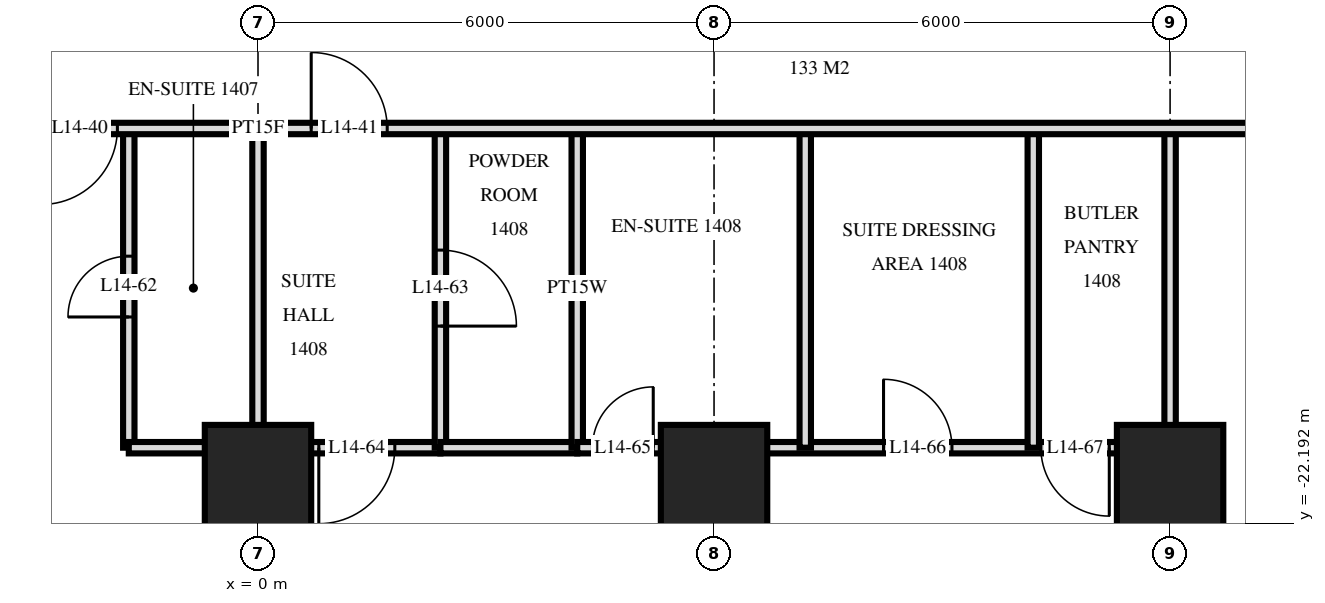
"""IFC4 building model, lengths in metres.
Left out: names, types, materials, properties, quantities, classifications, styles, units other than length and angle.
Written with IfcOpenShell. Run it as: python <this file> out.ifc"""

import sys

from ifc_helpers import new_model, si_unit, direction, frame, frame_2d, origin, origin_2d, place, context, subcontext, project, spatial, rectangle, extrude, element, fill, save


model = new_model("IFC4")
c1 = context("Model", 3, precision=1e-05, world=origin(), true_north=direction((0.0, 1.0)))
c2 = subcontext(c1, "Body", "Model", "MODEL_VIEW")
j1 = project(units=[si_unit("LENGTHUNIT", "METRE"), si_unit("PLANEANGLEUNIT", "RADIAN")], contexts=[c1])
p1 = place(None, origin())
s1 = spatial("IfcSite", under=j1, at=p1, CompositionType="ELEMENT")
p2 = place(p1, origin())
s2 = spatial("IfcBuilding", under=s1, at=p2, CompositionType="ELEMENT")
p3 = place(p2, frame((0.0, 0.0, 60.0)))
s3 = spatial("IfcBuildingStorey", under=s2, at=p3, CompositionType="ELEMENT", Elevation=60.0)
for number, where, z_axis, x_axis in (
    (1, (0.0, -21.6, 0.0), (0.0, 0.0, 1.0), (1.0, 0.0, 0.0)),
    (2, (6.0, -21.6, 0.0), (0.0, 0.0, 1.0), (1.0, 0.0, 0.0)),
    (3, (12.0, -21.6, 0.0), (0.0, 0.0, 1.0), (1.0, 0.0, 0.0)),
):
    element("IfcColumn", number, at=place(p3, frame(where, z_axis=z_axis, x_axis=x_axis)), inside=s3, PredefinedType="COLUMN", context=c2, shape_type="SweptSolid", body=[
        extrude(rectangle(XDim=1.4, YDim=1.4, at=origin_2d()), origin(), (0.0, 0.0, 1.0), 3.6),
    ])
p4 = place(p3, frame((12.0, -29.22, 0.0), z_axis=(0.0, 0.0, 1.0), x_axis=(0.0, 1.0, 0.0)))
e4 = element("IfcWall", 4, at=p4, inside=s3, PredefinedType="PARTITIONING", context=c2, shape_type="SweptSolid", body=[
    extrude(rectangle(XDim=12.22, YDim=0.15, at=frame_2d((6.11, 0.0))), origin(), (0.0, 0.0, 1.0), 3.32),
])
for number, where, z_axis, x_axis in (
    (5, (10.2, -21.2, 0.0), (0.0, 0.0, 1.0), (0.0, 1.0, 0.0)),
    (6, (7.2, -21.2, 0.0), (0.0, 0.0, 1.0), (0.0, 1.0, 0.0)),
):
    element("IfcWall", number, at=place(p3, frame(where, z_axis=z_axis, x_axis=x_axis)), inside=s3, PredefinedType="PARTITIONING", context=c2, shape_type="SweptSolid", body=[
        extrude(rectangle(XDim=4.2, YDim=0.15, at=frame_2d((2.1, 0.0))), origin(), (0.0, 0.0, 1.0), 3.32),
    ])
p5 = place(p3, frame((6.0, -29.22, 0.0), z_axis=(0.0, 0.0, 1.0), x_axis=(0.0, 1.0, 0.0)))
e7 = element("IfcWall", 7, at=p5, inside=s3, PredefinedType="PARTITIONING", context=c2, shape_type="SweptSolid", body=[
    extrude(rectangle(XDim=8.02, YDim=0.15, at=frame_2d((4.01, 0.0))), origin(), (0.0, 0.0, 1.0), 3.32),
])
p6 = place(p5, frame((3.45, 0.0, 0.0)))
e8 = element("IfcOpeningElement", 8, at=p6, cuts=e7, PredefinedType="OPENING", context=c2, shape_type="SweptSolid", body=[
    extrude(rectangle(XDim=0.9, YDim=2.1, at=frame_2d((0.45, 1.05))), frame((0.0, 0.085, 0.0), z_axis=(0.0, -1.0, 0.0), x_axis=(1.0, 0.0, 0.0)), (0.0, 0.0, 1.0), 0.17),
])
p7 = place(p3, frame((4.2, -21.2, 0.0), z_axis=(0.0, 0.0, 1.0), x_axis=(0.0, 1.0, 0.0)))
e9 = element("IfcWall", 9, at=p7, inside=s3, PredefinedType="PLUMBINGWALL", context=c2, shape_type="SweptSolid", body=[
    extrude(rectangle(XDim=4.2, YDim=0.15, at=frame_2d((2.1, 0.0))), origin(), (0.0, 0.0, 1.0), 3.32),
])
p8 = place(p3, frame((2.4, -21.2, 0.0), z_axis=(0.0, 0.0, 1.0), x_axis=(0.0, 1.0, 0.0)))
e10 = element("IfcWall", 10, at=p8, inside=s3, PredefinedType="PARTITIONING", context=c2, shape_type="SweptSolid", body=[
    extrude(rectangle(XDim=4.2, YDim=0.15, at=frame_2d((2.1, 0.0))), origin(), (0.0, 0.0, 1.0), 3.32),
])
p9 = place(p8, frame((1.6, 0.0, 0.0)))
e11 = element("IfcOpeningElement", 11, at=p9, cuts=e10, PredefinedType="OPENING", context=c2, shape_type="SweptSolid", body=[
    extrude(rectangle(XDim=1.0, YDim=2.1, at=frame_2d((0.5, 1.05))), frame((0.0, 0.085, 0.0), z_axis=(0.0, -1.0, 0.0), x_axis=(1.0, 0.0, 0.0)), (0.0, 0.0, 1.0), 0.17),
])
p10 = place(p3, frame((0.0, -21.2, 0.0), z_axis=(0.0, 0.0, 1.0), x_axis=(0.0, 1.0, 0.0)))
e12 = element("IfcWall", 12, at=p10, inside=s3, PredefinedType="PARTITIONING", context=c2, shape_type="SweptSolid", body=[
    extrude(rectangle(XDim=4.2, YDim=0.15, at=frame_2d((2.1, 0.0))), origin(), (0.0, 0.0, 1.0), 3.32),
])
p11 = place(p3, frame((0.0, -29.22, 0.0), z_axis=(0.0, 0.0, 1.0), x_axis=(0.0, 1.0, 0.0)))
e13 = element("IfcWall", 13, at=p11, inside=s3, PredefinedType="PARTITIONING", context=c2, shape_type="SweptSolid", body=[
    extrude(rectangle(XDim=8.02, YDim=0.15, at=frame_2d((4.01, 0.0))), origin(), (0.0, 0.0, 1.0), 3.32),
])
p12 = place(p3, frame((-1.7, -21.2, 0.0), z_axis=(0.0, 0.0, 1.0), x_axis=(0.0, 1.0, 0.0)))
e14 = element("IfcWall", 14, at=p12, inside=s3, PredefinedType="PARTITIONING", context=c2, shape_type="SweptSolid", body=[
    extrude(rectangle(XDim=4.2, YDim=0.15, at=frame_2d((2.1, 0.0))), origin(), (0.0, 0.0, 1.0), 3.32),
])
p13 = place(p12, frame((1.72, 0.0, 0.0)))
e15 = element("IfcOpeningElement", 15, at=p13, cuts=e14, PredefinedType="OPENING", context=c2, shape_type="SweptSolid", body=[
    extrude(rectangle(XDim=0.8, YDim=2.1, at=frame_2d((0.4, 1.05))), frame((0.0, 0.085, 0.0), z_axis=(0.0, -1.0, 0.0), x_axis=(1.0, 0.0, 0.0)), (0.0, 0.0, 1.0), 0.17),
])
p14 = place(p3, frame((0.0, -21.2, 0.0), z_axis=(0.0, 0.0, 1.0), x_axis=(1.0, 0.0, 0.0)))
e16 = element("IfcWall", 16, at=p14, inside=s3, PredefinedType="PARTITIONING", context=c2, shape_type="SweptSolid", body=[
    extrude(rectangle(XDim=2.4, YDim=0.15, at=frame_2d((1.2, 0.0))), origin(), (0.0, 0.0, 1.0), 3.32),
])
p15 = place(p14, frame((0.8, 0.0, 0.0)))
e17 = element("IfcOpeningElement", 17, at=p15, cuts=e16, PredefinedType="OPENING", context=c2, shape_type="SweptSolid", body=[
    extrude(rectangle(XDim=1.0, YDim=2.1, at=frame_2d((0.5, 1.05))), frame((0.0, 0.085, 0.0), z_axis=(0.0, -1.0, 0.0), x_axis=(1.0, 0.0, 0.0)), (0.0, 0.0, 1.0), 0.17),
])
p16 = place(p3, frame((-1.7, -21.2, 0.0), z_axis=(0.0, 0.0, 1.0), x_axis=(1.0, 0.0, 0.0)))
e18 = element("IfcWall", 18, at=p16, inside=s3, PredefinedType="PARTITIONING", context=c2, shape_type="SweptSolid", body=[
    extrude(rectangle(XDim=1.7, YDim=0.15, at=frame_2d((0.85, 0.0))), origin(), (0.0, 0.0, 1.0), 3.32),
])
p17 = place(p3, frame((4.2, -21.2, 0.0), z_axis=(0.0, 0.0, 1.0), x_axis=(1.0, 0.0, 0.0)))
e19 = element("IfcWall", 19, at=p17, inside=s3, PredefinedType="PARTITIONING", context=c2, shape_type="SweptSolid", body=[
    extrude(rectangle(XDim=7.8, YDim=0.15, at=frame_2d((3.9, 0.0))), origin(), (0.0, 0.0, 1.0), 3.32),
])
p18 = place(p17, frame((0.2, 0.0, 0.0)))
e20 = element("IfcOpeningElement", 20, at=p18, cuts=e19, PredefinedType="OPENING", context=c2, shape_type="SweptSolid", body=[
    extrude(rectangle(XDim=0.8, YDim=2.1, at=frame_2d((0.4, 1.05))), frame((0.0, 0.085, 0.0), z_axis=(0.0, -1.0, 0.0), x_axis=(1.0, 0.0, 0.0)), (0.0, 0.0, 1.0), 0.17),
])
p19 = place(p17, frame((4.03, 0.0, 0.0)))
e21 = element("IfcOpeningElement", 21, at=p19, cuts=e19, PredefinedType="OPENING", context=c2, shape_type="SweptSolid", body=[
    extrude(rectangle(XDim=0.9, YDim=2.1, at=frame_2d((0.45, 1.05))), frame((0.0, 0.085, 0.0), z_axis=(0.0, -1.0, 0.0), x_axis=(1.0, 0.0, 0.0)), (0.0, 0.0, 1.0), 0.17),
])
p20 = place(p17, frame((6.1, 0.0, 0.0)))
e22 = element("IfcOpeningElement", 22, at=p20, cuts=e19, PredefinedType="OPENING", context=c2, shape_type="SweptSolid", body=[
    extrude(rectangle(XDim=0.9, YDim=2.1, at=frame_2d((0.45, 1.05))), frame((0.0, 0.085, 0.0), z_axis=(0.0, -1.0, 0.0), x_axis=(1.0, 0.0, 0.0)), (0.0, 0.0, 1.0), 0.17),
])
p21 = place(p3, frame((2.4, -21.2, 0.0), z_axis=(0.0, 0.0, 1.0), x_axis=(1.0, 0.0, 0.0)))
e23 = element("IfcWall", 23, at=p21, inside=s3, PredefinedType="PLUMBINGWALL", context=c2, shape_type="SweptSolid", body=[
    extrude(rectangle(XDim=1.8, YDim=0.15, at=frame_2d((0.9, 0.0))), origin(), (0.0, 0.0, 1.0), 3.32),
])
p22 = place(p3, frame((-33.12, -17.0, 0.0), z_axis=(0.0, 0.0, 1.0), x_axis=(1.0, 0.0, 0.0)))
e24 = element("IfcWall", 24, at=p22, inside=s3, PredefinedType="PARTITIONING", context=c2, shape_type="SweptSolid", body=[
    extrude(rectangle(XDim=66.24, YDim=0.15, at=frame_2d((33.12, 0.0))), origin(), (0.0, 0.0, 1.0), 3.32),
])
p23 = place(p22, frame((12.27, 0.0, 0.0)))
e25 = element("IfcOpeningElement", 25, at=p23, cuts=e24, PredefinedType="OPENING", context=c2, shape_type="SweptSolid", body=[
    extrude(rectangle(XDim=1.0, YDim=2.1, at=frame_2d((0.5, 1.05))), frame((0.0, 0.085, 0.0), z_axis=(0.0, -1.0, 0.0), x_axis=(1.0, 0.0, 0.0)), (0.0, 0.0, 1.0), 0.17),
])
p24 = place(p22, frame((16.97, 0.0, 0.0)))
e26 = element("IfcOpeningElement", 26, at=p24, cuts=e24, PredefinedType="OPENING", context=c2, shape_type="SweptSolid", body=[
    extrude(rectangle(XDim=1.0, YDim=2.1, at=frame_2d((0.5, 1.05))), frame((0.0, 0.085, 0.0), z_axis=(0.0, -1.0, 0.0), x_axis=(1.0, 0.0, 0.0)), (0.0, 0.0, 1.0), 0.17),
])
p25 = place(p22, frame((18.27, 0.0, 0.0)))
e27 = element("IfcOpeningElement", 27, at=p25, cuts=e24, PredefinedType="OPENING", context=c2, shape_type="SweptSolid", body=[
    extrude(rectangle(XDim=1.0, YDim=2.1, at=frame_2d((0.5, 1.05))), frame((0.0, 0.085, 0.0), z_axis=(0.0, -1.0, 0.0), x_axis=(1.0, 0.0, 0.0)), (0.0, 0.0, 1.0), 0.17),
])
p26 = place(p22, frame((22.97, 0.0, 0.0)))
e28 = element("IfcOpeningElement", 28, at=p26, cuts=e24, PredefinedType="OPENING", context=c2, shape_type="SweptSolid", body=[
    extrude(rectangle(XDim=1.0, YDim=2.1, at=frame_2d((0.5, 1.05))), frame((0.0, 0.085, 0.0), z_axis=(0.0, -1.0, 0.0), x_axis=(1.0, 0.0, 0.0)), (0.0, 0.0, 1.0), 0.17),
])
p27 = place(p22, frame((24.27, 0.0, 0.0)))
e29 = element("IfcOpeningElement", 29, at=p27, cuts=e24, PredefinedType="OPENING", context=c2, shape_type="SweptSolid", body=[
    extrude(rectangle(XDim=1.0, YDim=2.1, at=frame_2d((0.5, 1.05))), frame((0.0, 0.085, 0.0), z_axis=(0.0, -1.0, 0.0), x_axis=(1.0, 0.0, 0.0)), (0.0, 0.0, 1.0), 0.17),
])
p28 = place(p22, frame((28.97, 0.0, 0.0)))
e30 = element("IfcOpeningElement", 30, at=p28, cuts=e24, PredefinedType="OPENING", context=c2, shape_type="SweptSolid", body=[
    extrude(rectangle(XDim=1.0, YDim=2.1, at=frame_2d((0.5, 1.05))), frame((0.0, 0.085, 0.0), z_axis=(0.0, -1.0, 0.0), x_axis=(1.0, 0.0, 0.0)), (0.0, 0.0, 1.0), 0.17),
])
p29 = place(p22, frame((30.27, 0.0, 0.0)))
e31 = element("IfcOpeningElement", 31, at=p29, cuts=e24, PredefinedType="OPENING", context=c2, shape_type="SweptSolid", body=[
    extrude(rectangle(XDim=1.0, YDim=2.1, at=frame_2d((0.5, 1.05))), frame((0.0, 0.085, 0.0), z_axis=(0.0, -1.0, 0.0), x_axis=(1.0, 0.0, 0.0)), (0.0, 0.0, 1.0), 0.17),
])
p30 = place(p22, frame((33.82, 0.0, 0.0)))
e32 = element("IfcOpeningElement", 32, at=p30, cuts=e24, PredefinedType="OPENING", context=c2, shape_type="SweptSolid", body=[
    extrude(rectangle(XDim=1.0, YDim=2.1, at=frame_2d((0.5, 1.05))), frame((0.0, 0.085, 0.0), z_axis=(0.0, -1.0, 0.0), x_axis=(1.0, 0.0, 0.0)), (0.0, 0.0, 1.0), 0.17),
])
p31 = place(p22, frame((46.27, 0.0, 0.0)))
e33 = element("IfcOpeningElement", 33, at=p31, cuts=e24, PredefinedType="OPENING", context=c2, shape_type="SweptSolid", body=[
    extrude(rectangle(XDim=1.0, YDim=2.1, at=frame_2d((0.5, 1.05))), frame((0.0, 0.085, 0.0), z_axis=(0.0, -1.0, 0.0), x_axis=(1.0, 0.0, 0.0)), (0.0, 0.0, 1.0), 0.17),
])
p32 = place(p22, frame((52.97, 0.0, 0.0)))
e34 = element("IfcOpeningElement", 34, at=p32, cuts=e24, PredefinedType="OPENING", context=c2, shape_type="SweptSolid", body=[
    extrude(rectangle(XDim=1.0, YDim=2.1, at=frame_2d((0.5, 1.05))), frame((0.0, 0.085, 0.0), z_axis=(0.0, -1.0, 0.0), x_axis=(1.0, 0.0, 0.0)), (0.0, 0.0, 1.0), 0.17),
])
p33 = place(p22, frame((6.05, 0.0, 0.0)))
e35 = element("IfcOpeningElement", 35, at=p33, cuts=e24, PredefinedType="OPENING", context=c2, shape_type="SweptSolid", body=[
    extrude(rectangle(XDim=1.0, YDim=2.1, at=frame_2d((0.5, 1.05))), frame((0.0, 0.085, 0.0), z_axis=(0.0, -1.0, 0.0), x_axis=(1.0, 0.0, 0.0)), (0.0, 0.0, 1.0), 0.17),
])
p34 = place(p22, frame((59.15, 0.0, 0.0)))
e36 = element("IfcOpeningElement", 36, at=p34, cuts=e24, PredefinedType="OPENING", context=c2, shape_type="SweptSolid", body=[
    extrude(rectangle(XDim=1.0, YDim=2.1, at=frame_2d((0.5, 1.05))), frame((0.0, 0.085, 0.0), z_axis=(0.0, -1.0, 0.0), x_axis=(1.0, 0.0, 0.0)), (0.0, 0.0, 1.0), 0.17),
])
p35 = place(p29, frame((0.5, 0.0, 0.0), z_axis=(0.0, 0.0, 1.0), x_axis=(-1.0, 0.0, 0.0)))
e37 = element("IfcDoor", 37, at=p35, inside=s3, OperationType="SINGLE_SWING_LEFT", PredefinedType="DOOR", context=c2, shape_type="SweptSolid", body=[
    extrude(rectangle(XDim=1.0, YDim=2.1, at=frame_2d((0.0, 1.05))), frame((0.0, -0.025, 0.0), z_axis=(0.0, 1.0, 0.0), x_axis=(-1.0, 0.0, 0.0)), (0.0, 0.0, 1.0), 0.05),
])
fill(e31, e37)
p36 = place(p30, origin())
e38 = element("IfcDoor", 38, at=p36, inside=s3, OperationType="SINGLE_SWING_RIGHT", PredefinedType="DOOR", context=c2, shape_type="SweptSolid", body=[
    extrude(rectangle(XDim=1.0, YDim=2.1, at=frame_2d((0.5, 1.05))), frame((0.0, 0.025, 0.0), z_axis=(0.0, -1.0, 0.0), x_axis=(1.0, 0.0, 0.0)), (0.0, 0.0, 1.0), 0.05),
])
fill(e32, e38)
p37 = place(p13, origin())
e39 = element("IfcDoor", 39, at=p37, inside=s3, OperationType="SINGLE_SWING_RIGHT", PredefinedType="DOOR", context=c2, shape_type="SweptSolid", body=[
    extrude(rectangle(XDim=0.8, YDim=2.1, at=frame_2d((0.4, 1.05))), frame((0.0, 0.025, 0.0), z_axis=(0.0, -1.0, 0.0), x_axis=(1.0, 0.0, 0.0)), (0.0, 0.0, 1.0), 0.05),
])
fill(e15, e39)
p38 = place(p9, frame((0.5, 0.0, 0.0), z_axis=(0.0, 0.0, 1.0), x_axis=(-1.0, 0.0, 0.0)))
e40 = element("IfcDoor", 40, at=p38, inside=s3, OperationType="SINGLE_SWING_LEFT", PredefinedType="DOOR", context=c2, shape_type="SweptSolid", body=[
    extrude(rectangle(XDim=1.0, YDim=2.1, at=frame_2d((0.0, 1.05))), frame((0.0, -0.025, 0.0), z_axis=(0.0, 1.0, 0.0), x_axis=(-1.0, 0.0, 0.0)), (0.0, 0.0, 1.0), 0.05),
])
fill(e11, e40)
p39 = place(p15, frame((0.5, 0.0, 0.0), z_axis=(0.0, 0.0, 1.0), x_axis=(-1.0, 0.0, 0.0)))
e41 = element("IfcDoor", 41, at=p39, inside=s3, OperationType="SINGLE_SWING_LEFT", PredefinedType="DOOR", context=c2, shape_type="SweptSolid", body=[
    extrude(rectangle(XDim=1.0, YDim=2.1, at=frame_2d((0.0, 1.05))), frame((0.0, -0.025, 0.0), z_axis=(0.0, 1.0, 0.0), x_axis=(-1.0, 0.0, 0.0)), (0.0, 0.0, 1.0), 0.05),
])
fill(e17, e41)
p40 = place(p18, origin())
e42 = element("IfcDoor", 42, at=p40, inside=s3, OperationType="SINGLE_SWING_LEFT", PredefinedType="DOOR", context=c2, shape_type="SweptSolid", body=[
    extrude(rectangle(XDim=0.8, YDim=2.1, at=frame_2d((0.4, 1.05))), frame((0.0, 0.025, 0.0), z_axis=(0.0, -1.0, 0.0), x_axis=(1.0, 0.0, 0.0)), (0.0, 0.0, 1.0), 0.05),
])
fill(e20, e42)
p41 = place(p19, origin())
e43 = element("IfcDoor", 43, at=p41, inside=s3, OperationType="SINGLE_SWING_RIGHT", PredefinedType="DOOR", context=c2, shape_type="SweptSolid", body=[
    extrude(rectangle(XDim=0.9, YDim=2.1, at=frame_2d((0.45, 1.05))), frame((0.0, 0.025, 0.0), z_axis=(0.0, -1.0, 0.0), x_axis=(1.0, 0.0, 0.0)), (0.0, 0.0, 1.0), 0.05),
])
fill(e21, e43)
p42 = place(p20, frame((0.45, 0.0, 0.0), z_axis=(0.0, 0.0, 1.0), x_axis=(-1.0, 0.0, 0.0)))
e44 = element("IfcDoor", 44, at=p42, inside=s3, OperationType="SINGLE_SWING_RIGHT", PredefinedType="DOOR", context=c2, shape_type="SweptSolid", body=[
    extrude(rectangle(XDim=0.9, YDim=2.1, at=frame_2d((0.0, 1.05))), frame((0.0, -0.025, 0.0), z_axis=(0.0, 1.0, 0.0), x_axis=(-1.0, 0.0, 0.0)), (0.0, 0.0, 1.0), 0.05),
])
fill(e22, e44)
save(model, sys.argv[1])
